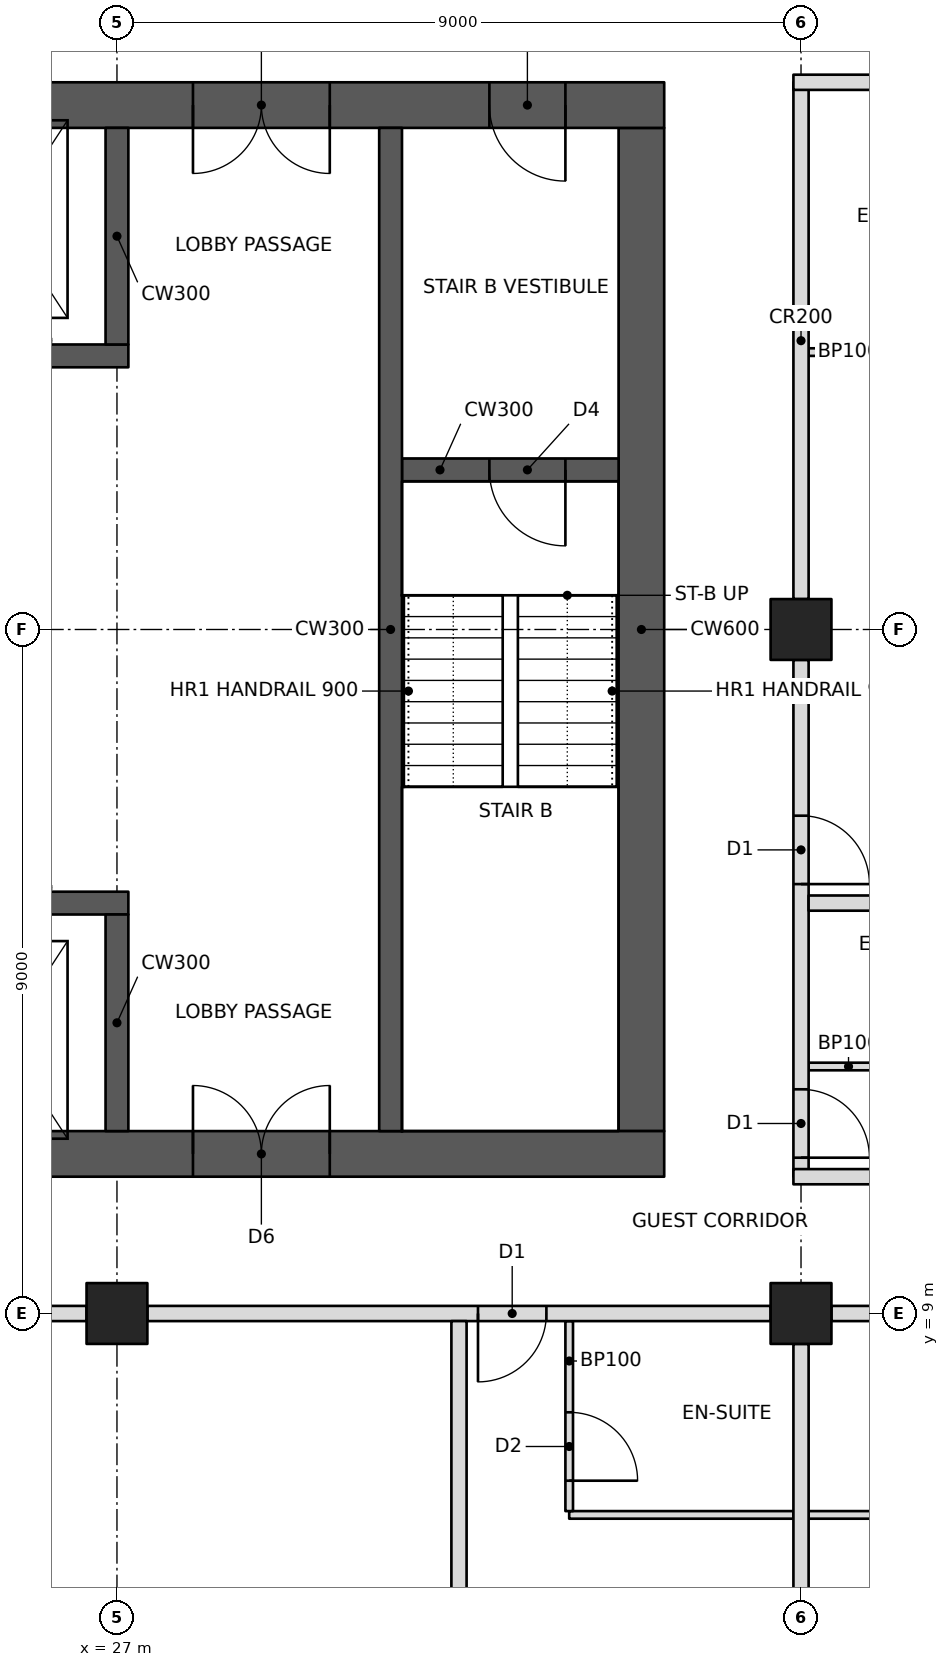
"""IFC4 building model, lengths in metres.
Left out: names, types, materials, properties, quantities, classifications, styles, units other than length and angle.
Written with IfcOpenShell. Run it as: python <this file> out.ifc"""

import sys

from ifc_helpers import new_model, si_unit, direction, frame, frame_2d, origin, origin_2d, place, context, subcontext, project, spatial, rectangle, hollow_rectangle, extrude, element, fill, save


model = new_model("IFC4")
c1 = context("Model", 3, precision=1e-05, world=origin(), true_north=direction((0.0, 1.0)))
c2 = subcontext(c1, "Body", "Model", "MODEL_VIEW")
j1 = project(units=[si_unit("LENGTHUNIT", "METRE"), si_unit("PLANEANGLEUNIT", "RADIAN")], contexts=[c1])
p1 = place(None, origin())
s1 = spatial("IfcSite", under=j1, at=p1, CompositionType="ELEMENT")
p2 = place(p1, origin())
s2 = spatial("IfcBuilding", under=s1, at=p2, CompositionType="ELEMENT")
p3 = place(p2, frame((0.0, 0.0, 208.0)))
s3 = spatial("IfcBuildingStorey", under=s2, at=p3, CompositionType="ELEMENT", Elevation=208.0)
for number, where, z_axis, x_axis in (
    (1, (27.0, 9.0, 0.0), (0.0, 0.0, 1.0), (1.0, 0.0, 0.0)),
    (2, (36.0, 9.0, 0.0), (0.0, 0.0, 1.0), (0.0, 1.0, 0.0)),
    (3, (36.0, 18.0, 0.0), (0.0, 0.0, 1.0), (0.0, 1.0, 0.0)),
):
    element("IfcColumn", number, at=place(p3, frame(where, z_axis=z_axis, x_axis=x_axis)), inside=s3, PredefinedType="COLUMN", context=c2, shape_type="SweptSolid", body=[
        extrude(hollow_rectangle(XDim=0.8, YDim=0.8, WallThickness=0.05, at=origin_2d()), origin(), (0.0, 0.0, 1.0), 3.4),
    ])
p4 = place(p3, frame((10.8, 11.1, 0.0), z_axis=(0.0, 0.0, 1.0), x_axis=(1.0, 0.0, 0.0)))
e4 = element("IfcWall", 4, at=p4, inside=s3, PredefinedType="SHEAR", context=c2, shape_type="SweptSolid", body=[
    extrude(rectangle(XDim=23.4, YDim=0.6, at=frame_2d((11.7, 0.0))), origin(), (0.0, 0.0, 1.0), 3.4),
])
p5 = place(p4, frame((1.0, 0.0, 0.0)))
e5 = element("IfcOpeningElement", 5, at=p5, cuts=e4, PredefinedType="OPENING", context=c2, shape_type="SweptSolid", body=[
    extrude(rectangle(XDim=1.0, YDim=2.1, at=frame_2d((0.5, 1.05))), frame((0.0, 0.31, 0.0), z_axis=(0.0, -1.0, 0.0), x_axis=(1.0, 0.0, 0.0)), (0.0, 0.0, 1.0), 0.62),
])
p6 = place(p4, frame((17.2, 0.0, 0.0)))
e6 = element("IfcOpeningElement", 6, at=p6, cuts=e4, PredefinedType="OPENING", context=c2, shape_type="SweptSolid", body=[
    extrude(rectangle(XDim=1.8, YDim=2.1, at=frame_2d((0.9, 1.05))), frame((0.0, 0.31, 0.0), z_axis=(0.0, -1.0, 0.0), x_axis=(1.0, 0.0, 0.0)), (0.0, 0.0, 1.0), 0.62),
])
p7 = place(p3, frame((10.8, 24.9, 0.0), z_axis=(0.0, 0.0, 1.0), x_axis=(1.0, 0.0, 0.0)))
e7 = element("IfcWall", 7, at=p7, inside=s3, PredefinedType="SHEAR", context=c2, shape_type="SweptSolid", body=[
    extrude(rectangle(XDim=23.4, YDim=0.6, at=frame_2d((11.7, 0.0))), origin(), (0.0, 0.0, 1.0), 3.4),
])
p8 = place(p7, frame((17.2, 0.0, 0.0)))
e8 = element("IfcOpeningElement", 8, at=p8, cuts=e7, PredefinedType="OPENING", context=c2, shape_type="SweptSolid", body=[
    extrude(rectangle(XDim=1.8, YDim=2.1, at=frame_2d((0.9, 1.05))), frame((0.0, 0.31, 0.0), z_axis=(0.0, -1.0, 0.0), x_axis=(1.0, 0.0, 0.0)), (0.0, 0.0, 1.0), 0.62),
])
p9 = place(p7, frame((21.1, 0.0, 0.0)))
e9 = element("IfcOpeningElement", 9, at=p9, cuts=e7, PredefinedType="OPENING", context=c2, shape_type="SweptSolid", body=[
    extrude(rectangle(XDim=1.0, YDim=2.1, at=frame_2d((0.5, 1.05))), frame((0.0, 0.31, 0.0), z_axis=(0.0, -1.0, 0.0), x_axis=(1.0, 0.0, 0.0)), (0.0, 0.0, 1.0), 0.62),
])
p10 = place(p7, frame((4.9, 0.0, 0.0)))
e10 = element("IfcOpeningElement", 10, at=p10, cuts=e7, PredefinedType="OPENING", context=c2, shape_type="SweptSolid", body=[
    extrude(rectangle(XDim=1.0, YDim=2.1, at=frame_2d((0.5, 1.05))), frame((0.0, 0.31, 0.0), z_axis=(0.0, -1.0, 0.0), x_axis=(1.0, 0.0, 0.0)), (0.0, 0.0, 1.0), 0.62),
])
p11 = place(p3, frame((33.9, 11.4, 0.0), z_axis=(0.0, 0.0, 1.0), x_axis=(0.0, 1.0, 0.0)))
e11 = element("IfcWall", 11, at=p11, inside=s3, PredefinedType="SHEAR", context=c2, shape_type="SweptSolid", body=[
    extrude(rectangle(XDim=13.2, YDim=0.6, at=frame_2d((6.6, 0.0))), origin(), (0.0, 0.0, 1.0), 3.4),
])
p12 = place(p3, frame((18.15, 14.4, 0.0), z_axis=(0.0, 0.0, 1.0), x_axis=(1.0, 0.0, 0.0)))
e12 = element("IfcWall", 12, at=p12, inside=s3, PredefinedType="SHEAR", context=c2, shape_type="SweptSolid", body=[
    extrude(rectangle(XDim=9.0, YDim=0.3, at=frame_2d((4.5, 0.0))), origin(), (0.0, 0.0, 1.0), 3.4),
])
p13 = place(p12, frame((0.8, 0.0, 0.0)))
e13 = element("IfcOpeningElement", 13, at=p13, cuts=e12, PredefinedType="OPENING", context=c2, shape_type="SweptSolid", body=[
    extrude(rectangle(XDim=1.1, YDim=2.1, at=frame_2d((0.55, 1.05))), frame((0.0, 0.16, 0.0), z_axis=(0.0, -1.0, 0.0), x_axis=(1.0, 0.0, 0.0)), (0.0, 0.0, 1.0), 0.32),
])
p14 = place(p12, frame((6.75, 0.0, 0.0)))
e14 = element("IfcOpeningElement", 14, at=p14, cuts=e12, PredefinedType="OPENING", context=c2, shape_type="SweptSolid", body=[
    extrude(rectangle(XDim=1.2, YDim=2.1, at=frame_2d((0.6, 1.05))), frame((0.0, 0.16, 0.0), z_axis=(0.0, -1.0, 0.0), x_axis=(1.0, 0.0, 0.0)), (0.0, 0.0, 1.0), 0.32),
])
p15 = place(p12, frame((3.8, 0.0, 0.0)))
e15 = element("IfcOpeningElement", 15, at=p15, cuts=e12, PredefinedType="OPENING", context=c2, shape_type="SweptSolid", body=[
    extrude(rectangle(XDim=1.1, YDim=2.1, at=frame_2d((0.55, 1.05))), frame((0.0, 0.16, 0.0), z_axis=(0.0, -1.0, 0.0), x_axis=(1.0, 0.0, 0.0)), (0.0, 0.0, 1.0), 0.32),
])
p16 = place(p3, frame((27.0, 11.4, 0.0), z_axis=(0.0, 0.0, 1.0), x_axis=(0.0, 1.0, 0.0)))
e16 = element("IfcWall", 16, at=p16, inside=s3, PredefinedType="SHEAR", context=c2, shape_type="SweptSolid", body=[
    extrude(rectangle(XDim=2.85, YDim=0.3, at=frame_2d((1.425, 0.0))), origin(), (0.0, 0.0, 1.0), 3.4),
])
p17 = place(p3, frame((18.15, 21.6, 0.0), z_axis=(0.0, 0.0, 1.0), x_axis=(1.0, 0.0, 0.0)))
e17 = element("IfcWall", 17, at=p17, inside=s3, PredefinedType="SHEAR", context=c2, shape_type="SweptSolid", body=[
    extrude(rectangle(XDim=9.0, YDim=0.3, at=frame_2d((4.5, 0.0))), origin(), (0.0, 0.0, 1.0), 3.4),
])
p18 = place(p17, frame((6.75, 0.0, 0.0)))
e18 = element("IfcOpeningElement", 18, at=p18, cuts=e17, PredefinedType="OPENING", context=c2, shape_type="SweptSolid", body=[
    extrude(rectangle(XDim=1.2, YDim=2.1, at=frame_2d((0.6, 1.05))), frame((0.0, 0.16, 0.0), z_axis=(0.0, -1.0, 0.0), x_axis=(1.0, 0.0, 0.0)), (0.0, 0.0, 1.0), 0.32),
])
p19 = place(p17, frame((0.8, 0.0, 0.0)))
e19 = element("IfcOpeningElement", 19, at=p19, cuts=e17, PredefinedType="OPENING", context=c2, shape_type="SweptSolid", body=[
    extrude(rectangle(XDim=1.1, YDim=2.1, at=frame_2d((0.55, 1.05))), frame((0.0, 0.16, 0.0), z_axis=(0.0, -1.0, 0.0), x_axis=(1.0, 0.0, 0.0)), (0.0, 0.0, 1.0), 0.32),
])
p20 = place(p17, frame((3.8, 0.0, 0.0)))
e20 = element("IfcOpeningElement", 20, at=p20, cuts=e17, PredefinedType="OPENING", context=c2, shape_type="SweptSolid", body=[
    extrude(rectangle(XDim=1.1, YDim=2.1, at=frame_2d((0.55, 1.05))), frame((0.0, 0.16, 0.0), z_axis=(0.0, -1.0, 0.0), x_axis=(1.0, 0.0, 0.0)), (0.0, 0.0, 1.0), 0.32),
])
p21 = place(p3, frame((27.0, 21.75, 0.0), z_axis=(0.0, 0.0, 1.0), x_axis=(0.0, 1.0, 0.0)))
e21 = element("IfcWall", 21, at=p21, inside=s3, PredefinedType="SHEAR", context=c2, shape_type="SweptSolid", body=[
    extrude(rectangle(XDim=2.85, YDim=0.3, at=frame_2d((1.425, 0.0))), origin(), (0.0, 0.0, 1.0), 3.4),
])
p22 = place(p3, frame((30.6, 11.4, 0.0), z_axis=(0.0, 0.0, 1.0), x_axis=(0.0, 1.0, 0.0)))
e22 = element("IfcWall", 22, at=p22, inside=s3, PredefinedType="SHEAR", context=c2, shape_type="SweptSolid", body=[
    extrude(rectangle(XDim=13.2, YDim=0.3, at=frame_2d((6.6, 0.0))), origin(), (0.0, 0.0, 1.0), 3.4),
])
p23 = place(p3, frame((30.75, 20.1, 0.0), z_axis=(0.0, 0.0, 1.0), x_axis=(1.0, 0.0, 0.0)))
e23 = element("IfcWall", 23, at=p23, inside=s3, PredefinedType="SHEAR", context=c2, shape_type="SweptSolid", body=[
    extrude(rectangle(XDim=2.85, YDim=0.3, at=frame_2d((1.425, 0.0))), origin(), (0.0, 0.0, 1.0), 3.4),
])
p24 = place(p23, frame((1.15, 0.0, 0.0)))
e24 = element("IfcOpeningElement", 24, at=p24, cuts=e23, PredefinedType="OPENING", context=c2, shape_type="SweptSolid", body=[
    extrude(rectangle(XDim=1.0, YDim=2.1, at=frame_2d((0.5, 1.05))), frame((0.0, 0.16, 0.0), z_axis=(0.0, -1.0, 0.0), x_axis=(1.0, 0.0, 0.0)), (0.0, 0.0, 1.0), 0.32),
])
p25 = place(p3, frame((18.4, 9.0, 0.0), z_axis=(0.0, 0.0, 1.0), x_axis=(1.0, 0.0, 0.0)))
e25 = element("IfcWall", 25, at=p25, inside=s3, PredefinedType="PARTITIONING", context=c2, shape_type="SweptSolid", body=[
    extrude(rectangle(XDim=8.2, YDim=0.2, at=frame_2d((4.1, 0.0))), origin(), (0.0, 0.0, 1.0), 2.405),
])
p26 = place(p25, frame((4.35, 0.0, 0.0)))
e26 = element("IfcOpeningElement", 26, at=p26, cuts=e25, PredefinedType="OPENING", context=c2, shape_type="SweptSolid", body=[
    extrude(rectangle(XDim=0.9, YDim=2.1, at=frame_2d((0.45, 1.05))), frame((0.0, 0.11, 0.0), z_axis=(0.0, -1.0, 0.0), x_axis=(1.0, 0.0, 0.0)), (0.0, 0.0, 1.0), 0.22),
])
p27 = place(p3, frame((27.4, 9.0, 0.0), z_axis=(0.0, 0.0, 1.0), x_axis=(1.0, 0.0, 0.0)))
e27 = element("IfcWall", 27, at=p27, inside=s3, PredefinedType="PARTITIONING", context=c2, shape_type="SweptSolid", body=[
    extrude(rectangle(XDim=8.2, YDim=0.2, at=frame_2d((4.1, 0.0))), origin(), (0.0, 0.0, 1.0), 2.405),
])
p28 = place(p27, frame((4.35, 0.0, 0.0)))
e28 = element("IfcOpeningElement", 28, at=p28, cuts=e27, PredefinedType="OPENING", context=c2, shape_type="SweptSolid", body=[
    extrude(rectangle(XDim=0.9, YDim=2.1, at=frame_2d((0.45, 1.05))), frame((0.0, 0.11, 0.0), z_axis=(0.0, -1.0, 0.0), x_axis=(1.0, 0.0, 0.0)), (0.0, 0.0, 1.0), 0.22),
])
p29 = place(p3, frame((36.4, 9.0, 0.0), z_axis=(0.0, 0.0, 1.0), x_axis=(1.0, 0.0, 0.0)))
e29 = element("IfcWall", 29, at=p29, inside=s3, PredefinedType="PARTITIONING", context=c2, shape_type="SweptSolid", body=[
    extrude(rectangle(XDim=7.6, YDim=0.2, at=frame_2d((3.8, 0.0))), origin(), (0.0, 0.0, 1.0), 2.438),
])
p30 = place(p29, frame((6.45, 0.0, 0.0)))
e30 = element("IfcOpeningElement", 30, at=p30, cuts=e29, PredefinedType="OPENING", context=c2, shape_type="SweptSolid", body=[
    extrude(rectangle(XDim=0.9, YDim=2.1, at=frame_2d((0.45, 1.05))), frame((0.0, 0.11, 0.0), z_axis=(0.0, -1.0, 0.0), x_axis=(1.0, 0.0, 0.0)), (0.0, 0.0, 1.0), 0.22),
])
p31 = place(p3, frame((36.0, 10.8, 0.0), z_axis=(0.0, 0.0, 1.0), x_axis=(0.0, 1.0, 0.0)))
e31 = element("IfcWall", 31, at=p31, inside=s3, PredefinedType="PARTITIONING", context=c2, shape_type="SweptSolid", body=[
    extrude(rectangle(XDim=6.8, YDim=0.2, at=frame_2d((3.4, 0.0))), origin(), (0.0, 0.0, 1.0), 2.405),
])
p32 = place(p31, frame((0.25, 0.0, 0.0)))
e32 = element("IfcOpeningElement", 32, at=p32, cuts=e31, PredefinedType="OPENING", context=c2, shape_type="SweptSolid", body=[
    extrude(rectangle(XDim=0.9, YDim=2.1, at=frame_2d((0.45, 1.05))), frame((0.0, 0.11, 0.0), z_axis=(0.0, -1.0, 0.0), x_axis=(1.0, 0.0, 0.0)), (0.0, 0.0, 1.0), 0.22),
])
p33 = place(p31, frame((3.85, 0.0, 0.0)))
e33 = element("IfcOpeningElement", 33, at=p33, cuts=e31, PredefinedType="OPENING", context=c2, shape_type="SweptSolid", body=[
    extrude(rectangle(XDim=0.9, YDim=2.1, at=frame_2d((0.45, 1.05))), frame((0.0, 0.11, 0.0), z_axis=(0.0, -1.0, 0.0), x_axis=(1.0, 0.0, 0.0)), (0.0, 0.0, 1.0), 0.22),
])
p34 = place(p3, frame((36.0, 18.4, 0.0), z_axis=(0.0, 0.0, 1.0), x_axis=(0.0, 1.0, 0.0)))
e34 = element("IfcWall", 34, at=p34, inside=s3, PredefinedType="PARTITIONING", context=c2, shape_type="SweptSolid", body=[
    extrude(rectangle(XDim=6.8, YDim=0.2, at=frame_2d((3.4, 0.0))), origin(), (0.0, 0.0, 1.0), 2.405),
])
p35 = place(p3, frame((35.9, 10.8, 0.0), z_axis=(0.0, 0.0, 1.0), x_axis=(1.0, 0.0, 0.0)))
e35 = element("IfcWall", 35, at=p35, inside=s3, PredefinedType="PARTITIONING", context=c2, shape_type="SweptSolid", body=[
    extrude(rectangle(XDim=8.1, YDim=0.2, at=frame_2d((4.05, 0.0))), origin(), (0.0, 0.0, 1.0), 2.404),
])
p36 = place(p3, frame((35.9, 25.2, 0.0), z_axis=(0.0, 0.0, 1.0), x_axis=(1.0, 0.0, 0.0)))
e36 = element("IfcWall", 36, at=p36, inside=s3, PredefinedType="PARTITIONING", context=c2, shape_type="SweptSolid", body=[
    extrude(rectangle(XDim=7.45, YDim=0.2, at=frame_2d((3.725, 0.0))), origin(), (0.0, 0.0, 1.0), 2.404),
])
p37 = place(p3, frame((31.5, 8.9, 0.0), z_axis=(0.0, 0.0, 1.0), x_axis=(0.0, -1.0, 0.0)))
e37 = element("IfcWall", 37, at=p37, inside=s3, PredefinedType="PARTITIONING", context=c2, shape_type="SweptSolid", body=[
    extrude(rectangle(XDim=7.9, YDim=0.2, at=frame_2d((3.95, 0.0))), origin(), (0.0, 0.0, 1.0), 2.404),
])
p38 = place(p3, frame((36.0, 8.6, 0.0), z_axis=(0.0, 0.0, 1.0), x_axis=(0.0, -1.0, 0.0)))
e38 = element("IfcWall", 38, at=p38, inside=s3, PredefinedType="PARTITIONING", context=c2, shape_type="SweptSolid", body=[
    extrude(rectangle(XDim=7.6, YDim=0.2, at=frame_2d((3.8, 0.0))), origin(), (0.0, 0.0, 1.0), 2.438),
])
p39 = place(p3, frame((32.95, 6.35, 0.0), z_axis=(0.0, 0.0, 1.0), x_axis=(1.0, 0.0, 0.0)))
e39 = element("IfcWall", 39, at=p39, inside=s3, PredefinedType="PARTITIONING", context=c2, shape_type="SweptSolid", body=[
    extrude(rectangle(XDim=2.95, YDim=0.1, at=frame_2d((1.475, 0.0))), origin(), (0.0, 0.0, 1.0), 2.438),
])
p40 = place(p3, frame((32.95, 8.9, 0.0), z_axis=(0.0, 0.0, 1.0), x_axis=(0.0, -1.0, 0.0)))
e40 = element("IfcWall", 40, at=p40, inside=s3, PredefinedType="PARTITIONING", context=c2, shape_type="SweptSolid", body=[
    extrude(rectangle(XDim=2.5, YDim=0.1, at=frame_2d((1.25, 0.0))), origin(), (0.0, 0.0, 1.0), 2.404),
])
p41 = place(p40, frame((1.2, 0.0, 0.0)))
e41 = element("IfcOpeningElement", 41, at=p41, cuts=e40, PredefinedType="OPENING", context=c2, shape_type="SweptSolid", body=[
    extrude(rectangle(XDim=0.9, YDim=2.1, at=frame_2d((0.45, 1.05))), frame((0.0, 0.06, 0.0), z_axis=(0.0, -1.0, 0.0), x_axis=(1.0, 0.0, 0.0)), (0.0, 0.0, 1.0), 0.12),
])
p42 = place(p3, frame((36.1, 6.35, 0.0), z_axis=(0.0, 0.0, 1.0), x_axis=(1.0, 0.0, 0.0)))
e42 = element("IfcWall", 42, at=p42, inside=s3, PredefinedType="PARTITIONING", context=c2, shape_type="SweptSolid", body=[
    extrude(rectangle(XDim=3.45, YDim=0.1, at=frame_2d((1.725, 0.0))), origin(), (0.0, 0.0, 1.0), 2.438),
])
p43 = place(p3, frame((36.1, 14.4, 0.0), z_axis=(0.0, 0.0, 1.0), x_axis=(1.0, 0.0, 0.0)))
e43 = element("IfcWall", 43, at=p43, inside=s3, PredefinedType="PARTITIONING", context=c2, shape_type="SweptSolid", body=[
    extrude(rectangle(XDim=7.9, YDim=0.2, at=frame_2d((3.95, 0.0))), origin(), (0.0, 0.0, 1.0), 2.404),
])
p44 = place(p3, frame((36.1, 12.25, 0.0), z_axis=(0.0, 0.0, 1.0), x_axis=(1.0, 0.0, 0.0)))
e44 = element("IfcWall", 44, at=p44, inside=s3, PredefinedType="PARTITIONING", context=c2, shape_type="SweptSolid", body=[
    extrude(rectangle(XDim=2.5, YDim=0.1, at=frame_2d((1.25, 0.0))), origin(), (0.0, 0.0, 1.0), 2.404),
])
p45 = place(p44, frame((1.2, 0.0, 0.0)))
e45 = element("IfcOpeningElement", 45, at=p45, cuts=e44, PredefinedType="OPENING", context=c2, shape_type="SweptSolid", body=[
    extrude(rectangle(XDim=0.9, YDim=2.1, at=frame_2d((0.45, 1.05))), frame((0.0, 0.06, 0.0), z_axis=(0.0, -1.0, 0.0), x_axis=(1.0, 0.0, 0.0)), (0.0, 0.0, 1.0), 0.12),
])
p46 = place(p3, frame((36.1, 21.65, 0.0), z_axis=(0.0, 0.0, 1.0), x_axis=(1.0, 0.0, 0.0)))
e46 = element("IfcWall", 46, at=p46, inside=s3, PredefinedType="PARTITIONING", context=c2, shape_type="SweptSolid", body=[
    extrude(rectangle(XDim=2.5, YDim=0.1, at=frame_2d((1.25, 0.0))), origin(), (0.0, 0.0, 1.0), 2.404),
])
p47 = place(p46, frame((1.2, 0.0, 0.0)))
e47 = element("IfcOpeningElement", 47, at=p47, cuts=e46, PredefinedType="OPENING", context=c2, shape_type="SweptSolid", body=[
    extrude(rectangle(XDim=0.9, YDim=2.1, at=frame_2d((0.45, 1.05))), frame((0.0, 0.06, 0.0), z_axis=(0.0, -1.0, 0.0), x_axis=(1.0, 0.0, 0.0)), (0.0, 0.0, 1.0), 0.12),
])
p48 = place(p41, origin())
e48 = element("IfcDoor", 48, at=p48, inside=s3, OperationType="SINGLE_SWING_RIGHT", PredefinedType="DOOR", context=c2, shape_type="SweptSolid", body=[
    extrude(rectangle(XDim=0.9, YDim=2.1, at=frame_2d((0.45, 1.05))), frame((0.0, 0.025, 0.0), z_axis=(0.0, -1.0, 0.0), x_axis=(1.0, 0.0, 0.0)), (0.0, 0.0, 1.0), 0.05),
])
fill(e41, e48)
p49 = place(p28, frame((0.9, 0.0, 0.0), z_axis=(0.0, 0.0, 1.0), x_axis=(-1.0, 0.0, 0.0)))
e49 = element("IfcDoor", 49, at=p49, inside=s3, OperationType="SINGLE_SWING_RIGHT", PredefinedType="DOOR", context=c2, shape_type="SweptSolid", body=[
    extrude(rectangle(XDim=0.9, YDim=2.1, at=frame_2d((0.45, 1.05))), frame((0.0, 0.025, 0.0), z_axis=(0.0, -1.0, 0.0), x_axis=(1.0, 0.0, 0.0)), (0.0, 0.0, 1.0), 0.05),
])
fill(e28, e49)
p50 = place(p32, frame((0.9, 0.0, 0.0), z_axis=(0.0, 0.0, 1.0), x_axis=(-1.0, 0.0, 0.0)))
e50 = element("IfcDoor", 50, at=p50, inside=s3, OperationType="SINGLE_SWING_RIGHT", PredefinedType="DOOR", context=c2, shape_type="SweptSolid", body=[
    extrude(rectangle(XDim=0.9, YDim=2.1, at=frame_2d((0.45, 1.05))), frame((0.0, 0.025, 0.0), z_axis=(0.0, -1.0, 0.0), x_axis=(1.0, 0.0, 0.0)), (0.0, 0.0, 1.0), 0.05),
])
fill(e32, e50)
p51 = place(p33, frame((0.9, 0.0, 0.0), z_axis=(0.0, 0.0, 1.0), x_axis=(-1.0, 0.0, 0.0)))
e51 = element("IfcDoor", 51, at=p51, inside=s3, OperationType="SINGLE_SWING_RIGHT", PredefinedType="DOOR", context=c2, shape_type="SweptSolid", body=[
    extrude(rectangle(XDim=0.9, YDim=2.1, at=frame_2d((0.45, 1.05))), frame((0.0, 0.025, 0.0), z_axis=(0.0, -1.0, 0.0), x_axis=(1.0, 0.0, 0.0)), (0.0, 0.0, 1.0), 0.05),
])
fill(e33, e51)
p52 = place(p6, origin())
e52 = element("IfcDoor", 52, at=p52, inside=s3, OperationType="DOUBLE_DOOR_SINGLE_SWING", PredefinedType="DOOR", context=c2, shape_type="SweptSolid", body=[
    extrude(rectangle(XDim=1.8, YDim=2.1, at=frame_2d((0.9, 1.05))), frame((0.0, 0.025, 0.0), z_axis=(0.0, -1.0, 0.0), x_axis=(1.0, 0.0, 0.0)), (0.0, 0.0, 1.0), 0.05),
])
fill(e6, e52)
p53 = place(p8, frame((1.8, 0.0, 0.0), z_axis=(0.0, 0.0, 1.0), x_axis=(-1.0, 0.0, 0.0)))
e53 = element("IfcDoor", 53, at=p53, inside=s3, OperationType="DOUBLE_DOOR_SINGLE_SWING", PredefinedType="DOOR", context=c2, shape_type="SweptSolid", body=[
    extrude(rectangle(XDim=1.8, YDim=2.1, at=frame_2d((0.9, 1.05))), frame((0.0, 0.025, 0.0), z_axis=(0.0, -1.0, 0.0), x_axis=(1.0, 0.0, 0.0)), (0.0, 0.0, 1.0), 0.05),
])
fill(e8, e53)
p54 = place(p9, frame((1.0, 0.0, 0.0), z_axis=(0.0, 0.0, 1.0), x_axis=(-1.0, 0.0, 0.0)))
e54 = element("IfcDoor", 54, at=p54, inside=s3, OperationType="SINGLE_SWING_LEFT", PredefinedType="DOOR", context=c2, shape_type="SweptSolid", body=[
    extrude(rectangle(XDim=1.0, YDim=2.1, at=frame_2d((0.5, 1.05))), frame((0.0, 0.025, 0.0), z_axis=(0.0, -1.0, 0.0), x_axis=(1.0, 0.0, 0.0)), (0.0, 0.0, 1.0), 0.05),
])
fill(e9, e54)
p55 = place(p24, frame((1.0, 0.0, 0.0), z_axis=(0.0, 0.0, 1.0), x_axis=(-1.0, 0.0, 0.0)))
e55 = element("IfcDoor", 55, at=p55, inside=s3, OperationType="SINGLE_SWING_LEFT", PredefinedType="DOOR", context=c2, shape_type="SweptSolid", body=[
    extrude(rectangle(XDim=1.0, YDim=2.1, at=frame_2d((0.5, 1.05))), frame((0.0, 0.025, 0.0), z_axis=(0.0, -1.0, 0.0), x_axis=(1.0, 0.0, 0.0)), (0.0, 0.0, 1.0), 0.05),
])
fill(e24, e55)
save(model, sys.argv[1])
